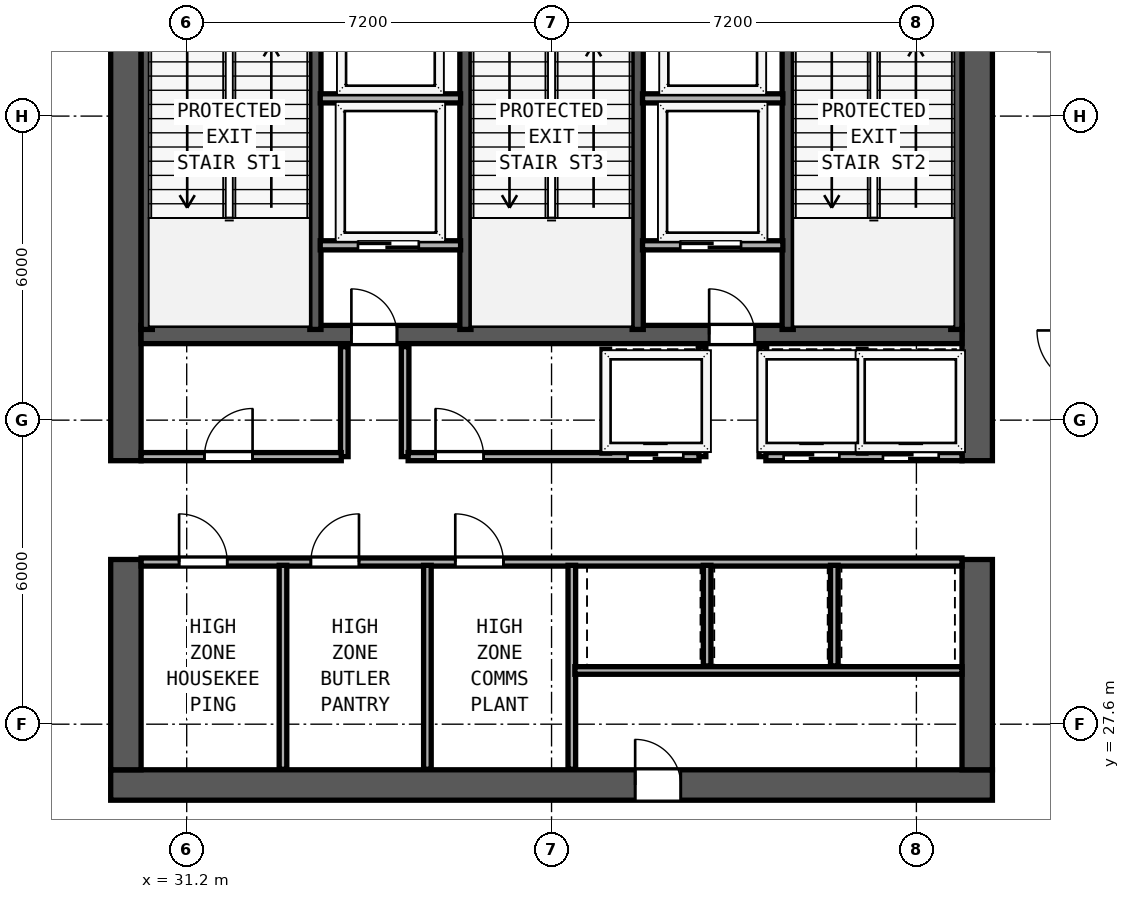
"""IFC4 building model, lengths in metres.
Left out: names, types, materials, properties, quantities, classifications, styles, units other than length and angle.
Written with IfcOpenShell. Run it as: python <this file> out.ifc"""

import sys

from ifc_helpers import new_model, si_unit, direction, frame, frame_2d, origin, place, context, subcontext, project, spatial, rectangle, extrude, element, fill, save


model = new_model("IFC4")
c1 = context("Model", 3, precision=1e-05, world=origin(), true_north=direction((0.0, 1.0)))
c2 = subcontext(c1, "Body", "Model", "MODEL_VIEW")
j1 = project(units=[si_unit("LENGTHUNIT", "METRE"), si_unit("PLANEANGLEUNIT", "RADIAN")], contexts=[c1])
p1 = place(None, origin())
s1 = spatial("IfcSite", under=j1, at=p1, CompositionType="ELEMENT")
p2 = place(p1, origin())
s2 = spatial("IfcBuilding", under=s1, at=p2, CompositionType="ELEMENT")
p3 = place(p2, frame((0.0, 0.0, 230.6)))
s3 = spatial("IfcBuildingStorey", under=s2, at=p3, CompositionType="ELEMENT", Elevation=230.6)
p4 = place(p3, frame((29.7, 26.4, 0.0), z_axis=(0.0, 0.0, 1.0), x_axis=(1.0, 0.0, 0.0)))
e1 = element("IfcWall", 1, at=p4, inside=s3, PredefinedType="SHEAR", context=c2, shape_type="SweptSolid", body=[
    extrude(rectangle(XDim=17.4, YDim=0.6, at=frame_2d((8.7, 0.0))), origin(), (0.0, 0.0, 1.0), 4.35),
])
p5 = place(p4, frame((11.25, 0.0, 0.0), z_axis=(0.0, 0.0, 1.0), x_axis=(-1.0, 0.0, 0.0)))
e2 = element("IfcOpeningElement", 2, at=p5, cuts=e1, PredefinedType="OPENING", context=c2, shape_type="SweptSolid", body=[
    extrude(rectangle(XDim=0.9, YDim=2.1, at=frame_2d((0.45, 1.05))), frame((0.0, 0.31, 0.0), z_axis=(0.0, -1.0, 0.0), x_axis=(1.0, 0.0, 0.0)), (0.0, 0.0, 1.0), 0.62),
])
p6 = place(p3, frame((30.0, 26.7, 0.0), z_axis=(0.0, 0.0, 1.0), x_axis=(0.0, 1.0, 0.0)))
e3 = element("IfcWall", 3, at=p6, inside=s3, PredefinedType="SHEAR", context=c2, shape_type="SweptSolid", body=[
    extrude(rectangle(XDim=4.15, YDim=0.6, at=frame_2d((2.075, 0.0))), origin(), (0.0, 0.0, 1.0), 4.35),
])
p7 = place(p3, frame((30.0, 32.8, 0.0), z_axis=(0.0, 0.0, 1.0), x_axis=(0.0, 1.0, 0.0)))
e4 = element("IfcWall", 4, at=p7, inside=s3, PredefinedType="SHEAR", context=c2, shape_type="SweptSolid", body=[
    extrude(rectangle(XDim=10.1, YDim=0.6, at=frame_2d((5.05, 0.0))), origin(), (0.0, 0.0, 1.0), 4.35),
])
p8 = place(p3, frame((46.8, 26.7, 0.0), z_axis=(0.0, 0.0, 1.0), x_axis=(0.0, 1.0, 0.0)))
e5 = element("IfcWall", 5, at=p8, inside=s3, PredefinedType="SHEAR", context=c2, shape_type="SweptSolid", body=[
    extrude(rectangle(XDim=4.15, YDim=0.6, at=frame_2d((2.075, 0.0))), origin(), (0.0, 0.0, 1.0), 4.35),
])
p9 = place(p3, frame((46.8, 32.8, 0.0), z_axis=(0.0, 0.0, 1.0), x_axis=(0.0, 1.0, 0.0)))
e6 = element("IfcWall", 6, at=p9, inside=s3, PredefinedType="SHEAR", context=c2, shape_type="SweptSolid", body=[
    extrude(rectangle(XDim=10.1, YDim=0.6, at=frame_2d((5.05, 0.0))), origin(), (0.0, 0.0, 1.0), 4.35),
])
p10 = place(p3, frame((30.3, 35.29, 0.0), z_axis=(0.0, 0.0, 1.0), x_axis=(1.0, 0.0, 0.0)))
e7 = element("IfcWall", 7, at=p10, inside=s3, PredefinedType="SHEAR", context=c2, shape_type="SweptSolid", body=[
    extrude(rectangle(XDim=16.2, YDim=0.36, at=frame_2d((8.1, 0.0))), origin(), (0.0, 0.0, 1.0), 4.35),
])
p11 = place(p10, frame((5.05, 0.0, 0.0), z_axis=(0.0, 0.0, 1.0), x_axis=(-1.0, 0.0, 0.0)))
e8 = element("IfcOpeningElement", 8, at=p11, cuts=e7, PredefinedType="OPENING", context=c2, shape_type="SweptSolid", body=[
    extrude(rectangle(XDim=0.9, YDim=2.1, at=frame_2d((0.45, 1.05))), frame((0.0, 0.19, 0.0), z_axis=(0.0, -1.0, 0.0), x_axis=(1.0, 0.0, 0.0)), (0.0, 0.0, 1.0), 0.38),
])
p12 = place(p10, frame((12.11, 0.0, 0.0), z_axis=(0.0, 0.0, 1.0), x_axis=(-1.0, 0.0, 0.0)))
e9 = element("IfcOpeningElement", 9, at=p12, cuts=e7, PredefinedType="OPENING", context=c2, shape_type="SweptSolid", body=[
    extrude(rectangle(XDim=0.9, YDim=2.1, at=frame_2d((0.45, 1.05))), frame((0.0, 0.19, 0.0), z_axis=(0.0, -1.0, 0.0), x_axis=(1.0, 0.0, 0.0)), (0.0, 0.0, 1.0), 0.38),
])
for number, where, z_axis, x_axis in (
    (10, (30.412, 35.39, 0.0), (0.0, 0.0, 1.0), (0.0, 1.0, 0.0)),
    (11, (33.74, 35.39, 0.0), (0.0, 0.0, 1.0), (0.0, 1.0, 0.0)),
    (12, (36.7, 35.39, 0.0), (0.0, 0.0, 1.0), (0.0, 1.0, 0.0)),
    (13, (40.1, 35.39, 0.0), (0.0, 0.0, 1.0), (0.0, 1.0, 0.0)),
    (14, (43.06, 35.39, 0.0), (0.0, 0.0, 1.0), (0.0, 1.0, 0.0)),
    (15, (46.388, 35.39, 0.0), (0.0, 0.0, 1.0), (0.0, 1.0, 0.0)),
):
    element("IfcWall", number, at=place(p3, frame(where, z_axis=z_axis, x_axis=x_axis)), inside=s3, PredefinedType="SHEAR", context=c2, shape_type="SweptSolid", body=[
        extrude(rectangle(XDim=7.51, YDim=0.22, at=frame_2d((3.755, 0.0))), origin(), (0.0, 0.0, 1.0), 4.35),
    ])
for number, where, z_axis, x_axis in (
    (16, (33.835, 39.95, 0.0), (0.0, 0.0, 1.0), (1.0, 0.0, 0.0)),
    (17, (40.195, 39.95, 0.0), (0.0, 0.0, 1.0), (1.0, 0.0, 0.0)),
):
    element("IfcWall", number, at=place(p3, frame(where, z_axis=z_axis, x_axis=x_axis)), inside=s3, PredefinedType="SOLIDWALL", context=c2, shape_type="SweptSolid", body=[
        extrude(rectangle(XDim=2.77, YDim=0.18, at=frame_2d((1.385, 0.0))), origin(), (0.0, 0.0, 1.0), 4.35),
    ])
p13 = place(p3, frame((33.835, 37.05, 0.0), z_axis=(0.0, 0.0, 1.0), x_axis=(1.0, 0.0, 0.0)))
e18 = element("IfcWall", 18, at=p13, inside=s3, PredefinedType="SOLIDWALL", context=c2, shape_type="SweptSolid", body=[
    extrude(rectangle(XDim=2.77, YDim=0.18, at=frame_2d((1.385, 0.0))), origin(), (0.0, 0.0, 1.0), 4.35),
])
p14 = place(p13, frame((1.945, 0.0, 0.0), z_axis=(0.0, 0.0, 1.0), x_axis=(-1.0, 0.0, 0.0)))
e19 = element("IfcOpeningElement", 19, at=p14, cuts=e18, PredefinedType="OPENING", context=c2, shape_type="SweptSolid", body=[
    extrude(rectangle(XDim=1.2, YDim=2.2, at=frame_2d((0.6, 1.1))), frame((0.0, 0.1, 0.0), z_axis=(0.0, -1.0, 0.0), x_axis=(1.0, 0.0, 0.0)), (0.0, 0.0, 1.0), 0.2),
])
for number, where, z_axis, x_axis in (
    (20, (34.31, 32.88, 0.0), (0.0, 0.0, 1.0), (0.0, 1.0, 0.0)),
    (21, (35.51, 32.88, 0.0), (0.0, 0.0, 1.0), (0.0, 1.0, 0.0)),
):
    element("IfcWall", number, at=place(p3, frame(where, z_axis=z_axis, x_axis=x_axis)), inside=s3, PredefinedType="SOLIDWALL", context=c2, shape_type="SweptSolid", body=[
        extrude(rectangle(XDim=2.17, YDim=0.15, at=frame_2d((1.085, 0.0))), origin(), (0.0, 0.0, 1.0), 4.35),
    ])
p15 = place(p3, frame((40.195, 37.05, 0.0), z_axis=(0.0, 0.0, 1.0), x_axis=(1.0, 0.0, 0.0)))
e22 = element("IfcWall", 22, at=p15, inside=s3, PredefinedType="SOLIDWALL", context=c2, shape_type="SweptSolid", body=[
    extrude(rectangle(XDim=2.77, YDim=0.18, at=frame_2d((1.385, 0.0))), origin(), (0.0, 0.0, 1.0), 4.35),
])
p16 = place(p15, frame((1.945, 0.0, 0.0), z_axis=(0.0, 0.0, 1.0), x_axis=(-1.0, 0.0, 0.0)))
e23 = element("IfcOpeningElement", 23, at=p16, cuts=e22, PredefinedType="OPENING", context=c2, shape_type="SweptSolid", body=[
    extrude(rectangle(XDim=1.2, YDim=2.2, at=frame_2d((0.6, 1.1))), frame((0.0, 0.1, 0.0), z_axis=(0.0, -1.0, 0.0), x_axis=(1.0, 0.0, 0.0)), (0.0, 0.0, 1.0), 0.2),
])
for number, where, z_axis, x_axis in (
    (24, (41.37, 32.88, 0.0), (0.0, 0.0, 1.0), (0.0, 1.0, 0.0)),
    (25, (42.57, 32.88, 0.0), (0.0, 0.0, 1.0), (0.0, 1.0, 0.0)),
):
    element("IfcWall", number, at=place(p3, frame(where, z_axis=z_axis, x_axis=x_axis)), inside=s3, PredefinedType="SOLIDWALL", context=c2, shape_type="SweptSolid", body=[
        extrude(rectangle(XDim=2.17, YDim=0.15, at=frame_2d((1.085, 0.0))), origin(), (0.0, 0.0, 1.0), 4.35),
    ])
p17 = place(p3, frame((30.3, 32.88, 0.0), z_axis=(0.0, 0.0, 1.0), x_axis=(1.0, 0.0, 0.0)))
e26 = element("IfcWall", 26, at=p17, inside=s3, PredefinedType="SOLIDWALL", context=c2, shape_type="SweptSolid", body=[
    extrude(rectangle(XDim=3.95, YDim=0.16, at=frame_2d((1.975, 0.0))), origin(), (0.0, 0.0, 1.0), 4.35),
])
p18 = place(p17, frame((2.2, 0.0, 0.0), z_axis=(0.0, 0.0, 1.0), x_axis=(-1.0, 0.0, 0.0)))
e27 = element("IfcOpeningElement", 27, at=p18, cuts=e26, PredefinedType="OPENING", context=c2, shape_type="SweptSolid", body=[
    extrude(rectangle(XDim=0.95, YDim=2.12, at=frame_2d((0.475, 1.06))), frame((0.0, 0.09, 0.0), z_axis=(0.0, -1.0, 0.0), x_axis=(1.0, 0.0, 0.0)), (0.0, 0.0, 1.0), 0.18),
])
p19 = place(p3, frame((35.57, 32.88, 0.0), z_axis=(0.0, 0.0, 1.0), x_axis=(1.0, 0.0, 0.0)))
e28 = element("IfcWall", 28, at=p19, inside=s3, PredefinedType="SOLIDWALL", context=c2, shape_type="SweptSolid", body=[
    extrude(rectangle(XDim=5.74, YDim=0.16, at=frame_2d((2.87, 0.0))), origin(), (0.0, 0.0, 1.0), 4.35),
])
p20 = place(p19, frame((1.49, 0.0, 0.0), z_axis=(0.0, 0.0, 1.0), x_axis=(-1.0, 0.0, 0.0)))
e29 = element("IfcOpeningElement", 29, at=p20, cuts=e28, PredefinedType="OPENING", context=c2, shape_type="SweptSolid", body=[
    extrude(rectangle(XDim=0.95, YDim=2.12, at=frame_2d((0.475, 1.06))), frame((0.0, 0.09, 0.0), z_axis=(0.0, -1.0, 0.0), x_axis=(1.0, 0.0, 0.0)), (0.0, 0.0, 1.0), 0.18),
])
p21 = place(p19, frame((5.43, 0.0, 0.0), z_axis=(0.0, 0.0, 1.0), x_axis=(-1.0, 0.0, 0.0)))
e30 = element("IfcOpeningElement", 30, at=p21, cuts=e28, PredefinedType="OPENING", context=c2, shape_type="SweptSolid", body=[
    extrude(rectangle(XDim=1.1, YDim=2.2, at=frame_2d((0.55, 1.1))), frame((0.0, 0.09, 0.0), z_axis=(0.0, -1.0, 0.0), x_axis=(1.0, 0.0, 0.0)), (0.0, 0.0, 1.0), 0.18),
])
p22 = place(p3, frame((42.63, 32.88, 0.0), z_axis=(0.0, 0.0, 1.0), x_axis=(1.0, 0.0, 0.0)))
e31 = element("IfcWall", 31, at=p22, inside=s3, PredefinedType="SOLIDWALL", context=c2, shape_type="SweptSolid", body=[
    extrude(rectangle(XDim=3.87, YDim=0.16, at=frame_2d((1.935, 0.0))), origin(), (0.0, 0.0, 1.0), 4.35),
])
p23 = place(p22, frame((1.45, 0.0, 0.0), z_axis=(0.0, 0.0, 1.0), x_axis=(-1.0, 0.0, 0.0)))
e32 = element("IfcOpeningElement", 32, at=p23, cuts=e31, PredefinedType="OPENING", context=c2, shape_type="SweptSolid", body=[
    extrude(rectangle(XDim=1.1, YDim=2.2, at=frame_2d((0.55, 1.1))), frame((0.0, 0.09, 0.0), z_axis=(0.0, -1.0, 0.0), x_axis=(1.0, 0.0, 0.0)), (0.0, 0.0, 1.0), 0.18),
])
p24 = place(p22, frame((3.41, 0.0, 0.0), z_axis=(0.0, 0.0, 1.0), x_axis=(-1.0, 0.0, 0.0)))
e33 = element("IfcOpeningElement", 33, at=p24, cuts=e31, PredefinedType="OPENING", context=c2, shape_type="SweptSolid", body=[
    extrude(rectangle(XDim=1.1, YDim=2.2, at=frame_2d((0.55, 1.1))), frame((0.0, 0.09, 0.0), z_axis=(0.0, -1.0, 0.0), x_axis=(1.0, 0.0, 0.0)), (0.0, 0.0, 1.0), 0.18),
])
for number, where, z_axis, x_axis in (
    (34, (39.47, 32.95, 0.0), (0.0, 0.0, 1.0), (0.0, 1.0, 0.0)),
    (35, (44.53, 32.95, 0.0), (0.0, 0.0, 1.0), (0.0, 1.0, 0.0)),
):
    element("IfcWall", number, at=place(p3, frame(where, z_axis=z_axis, x_axis=x_axis)), inside=s3, PredefinedType="SOLIDWALL", context=c2, shape_type="SweptSolid", body=[
        extrude(rectangle(XDim=2.05, YDim=0.15, at=frame_2d((1.025, 0.0))), origin(), (0.0, 0.0, 1.0), 4.35),
    ])
p25 = place(p3, frame((30.3, 30.8, 0.0), z_axis=(0.0, 0.0, 1.0), x_axis=(1.0, 0.0, 0.0)))
e36 = element("IfcWall", 36, at=p25, inside=s3, PredefinedType="SOLIDWALL", context=c2, shape_type="SweptSolid", body=[
    extrude(rectangle(XDim=16.2, YDim=0.16, at=frame_2d((8.1, 0.0))), origin(), (0.0, 0.0, 1.0), 4.35),
])
p26 = place(p25, frame((0.75, 0.0, 0.0)))
e37 = element("IfcOpeningElement", 37, at=p26, cuts=e36, PredefinedType="OPENING", context=c2, shape_type="SweptSolid", body=[
    extrude(rectangle(XDim=0.95, YDim=2.12, at=frame_2d((0.475, 1.06))), frame((0.0, 0.09, 0.0), z_axis=(0.0, -1.0, 0.0), x_axis=(1.0, 0.0, 0.0)), (0.0, 0.0, 1.0), 0.18),
])
p27 = place(p25, frame((3.35, 0.0, 0.0)))
e38 = element("IfcOpeningElement", 38, at=p27, cuts=e36, PredefinedType="OPENING", context=c2, shape_type="SweptSolid", body=[
    extrude(rectangle(XDim=0.95, YDim=2.12, at=frame_2d((0.475, 1.06))), frame((0.0, 0.09, 0.0), z_axis=(0.0, -1.0, 0.0), x_axis=(1.0, 0.0, 0.0)), (0.0, 0.0, 1.0), 0.18),
])
p28 = place(p25, frame((6.2, 0.0, 0.0)))
e39 = element("IfcOpeningElement", 39, at=p28, cuts=e36, PredefinedType="OPENING", context=c2, shape_type="SweptSolid", body=[
    extrude(rectangle(XDim=0.95, YDim=2.12, at=frame_2d((0.475, 1.06))), frame((0.0, 0.09, 0.0), z_axis=(0.0, -1.0, 0.0), x_axis=(1.0, 0.0, 0.0)), (0.0, 0.0, 1.0), 0.18),
])
p29 = place(p3, frame((38.8, 26.71, 0.0), z_axis=(0.0, 0.0, 1.0), x_axis=(0.0, 1.0, 0.0)))
e40 = element("IfcWall", 40, at=p29, inside=s3, PredefinedType="SOLIDWALL", context=c2, shape_type="SweptSolid", body=[
    extrude(rectangle(XDim=4.025, YDim=0.15, at=frame_2d((2.013, 0.0))), origin(), (0.0, 0.0, 1.0), 4.35),
])
for number, where, z_axis, x_axis in (
    (41, (33.1, 26.71, 0.0), (0.0, 0.0, 1.0), (0.0, 1.0, 0.0)),
    (42, (35.95, 26.71, 0.0), (0.0, 0.0, 1.0), (0.0, 1.0, 0.0)),
):
    element("IfcWall", number, at=place(p3, frame(where, z_axis=z_axis, x_axis=x_axis)), inside=s3, PredefinedType="PARTITIONING", context=c2, shape_type="SweptSolid", body=[
        extrude(rectangle(XDim=4.025, YDim=0.15, at=frame_2d((2.013, 0.0))), origin(), (0.0, 0.0, 1.0), 4.35),
    ])
p30 = place(p3, frame((38.86, 28.66, 0.0), z_axis=(0.0, 0.0, 1.0), x_axis=(1.0, 0.0, 0.0)))
e43 = element("IfcWall", 43, at=p30, inside=s3, PredefinedType="PARTITIONING", context=c2, shape_type="SweptSolid", body=[
    extrude(rectangle(XDim=7.64, YDim=0.15, at=frame_2d((3.82, 0.0))), origin(), (0.0, 0.0, 1.0), 4.35),
])
for number, where, z_axis, x_axis in (
    (44, (41.47, 28.75, 0.0), (0.0, 0.0, 1.0), (0.0, 1.0, 0.0)),
    (45, (43.98, 28.75, 0.0), (0.0, 0.0, 1.0), (0.0, 1.0, 0.0)),
):
    element("IfcWall", number, at=place(p3, frame(where, z_axis=z_axis, x_axis=x_axis)), inside=s3, PredefinedType="SOLIDWALL", context=c2, shape_type="SweptSolid", body=[
        extrude(rectangle(XDim=1.985, YDim=0.15, at=frame_2d((0.993, 0.0))), origin(), (0.0, 0.0, 1.0), 4.35),
    ])
p31 = place(p14, origin())
e46 = element("IfcDoor", 46, at=p31, inside=s3, OperationType="SLIDING_TO_RIGHT", PredefinedType="DOOR", context=c2, shape_type="SweptSolid", body=[
    extrude(rectangle(XDim=1.2, YDim=2.2, at=frame_2d((0.6, 1.1))), frame((0.0, 0.025, 0.0), z_axis=(0.0, -1.0, 0.0), x_axis=(1.0, 0.0, 0.0)), (0.0, 0.0, 1.0), 0.05),
])
fill(e19, e46)
p32 = place(p11, origin())
e47 = element("IfcDoor", 47, at=p32, inside=s3, OperationType="SINGLE_SWING_RIGHT", PredefinedType="DOOR", context=c2, shape_type="SweptSolid", body=[
    extrude(rectangle(XDim=0.9, YDim=2.1, at=frame_2d((0.45, 1.05))), frame((0.0, 0.025, 0.0), z_axis=(0.0, -1.0, 0.0), x_axis=(1.0, 0.0, 0.0)), (0.0, 0.0, 1.0), 0.05),
])
fill(e8, e47)
p33 = place(p16, origin())
e48 = element("IfcDoor", 48, at=p33, inside=s3, OperationType="SLIDING_TO_RIGHT", PredefinedType="DOOR", context=c2, shape_type="SweptSolid", body=[
    extrude(rectangle(XDim=1.2, YDim=2.2, at=frame_2d((0.6, 1.1))), frame((0.0, 0.025, 0.0), z_axis=(0.0, -1.0, 0.0), x_axis=(1.0, 0.0, 0.0)), (0.0, 0.0, 1.0), 0.05),
])
fill(e23, e48)
p34 = place(p12, origin())
e49 = element("IfcDoor", 49, at=p34, inside=s3, OperationType="SINGLE_SWING_RIGHT", PredefinedType="DOOR", context=c2, shape_type="SweptSolid", body=[
    extrude(rectangle(XDim=0.9, YDim=2.1, at=frame_2d((0.45, 1.05))), frame((0.0, 0.025, 0.0), z_axis=(0.0, -1.0, 0.0), x_axis=(1.0, 0.0, 0.0)), (0.0, 0.0, 1.0), 0.05),
])
fill(e9, e49)
p35 = place(p18, origin())
e50 = element("IfcDoor", 50, at=p35, inside=s3, OperationType="SINGLE_SWING_LEFT", PredefinedType="DOOR", context=c2, shape_type="SweptSolid", body=[
    extrude(rectangle(XDim=0.95, YDim=2.12, at=frame_2d((0.475, 1.06))), frame((0.0, 0.025, 0.0), z_axis=(0.0, -1.0, 0.0), x_axis=(1.0, 0.0, 0.0)), (0.0, 0.0, 1.0), 0.05),
])
fill(e27, e50)
p36 = place(p20, origin())
e51 = element("IfcDoor", 51, at=p36, inside=s3, OperationType="SINGLE_SWING_RIGHT", PredefinedType="DOOR", context=c2, shape_type="SweptSolid", body=[
    extrude(rectangle(XDim=0.95, YDim=2.12, at=frame_2d((0.475, 1.06))), frame((0.0, 0.025, 0.0), z_axis=(0.0, -1.0, 0.0), x_axis=(1.0, 0.0, 0.0)), (0.0, 0.0, 1.0), 0.05),
])
fill(e29, e51)
p37 = place(p21, origin())
e52 = element("IfcDoor", 52, at=p37, inside=s3, OperationType="SLIDING_TO_RIGHT", PredefinedType="DOOR", context=c2, shape_type="SweptSolid", body=[
    extrude(rectangle(XDim=1.1, YDim=2.2, at=frame_2d((0.55, 1.1))), frame((0.0, 0.025, 0.0), z_axis=(0.0, -1.0, 0.0), x_axis=(1.0, 0.0, 0.0)), (0.0, 0.0, 1.0), 0.05),
])
fill(e30, e52)
p38 = place(p23, origin())
e53 = element("IfcDoor", 53, at=p38, inside=s3, OperationType="SLIDING_TO_RIGHT", PredefinedType="DOOR", context=c2, shape_type="SweptSolid", body=[
    extrude(rectangle(XDim=1.1, YDim=2.2, at=frame_2d((0.55, 1.1))), frame((0.0, 0.025, 0.0), z_axis=(0.0, -1.0, 0.0), x_axis=(1.0, 0.0, 0.0)), (0.0, 0.0, 1.0), 0.05),
])
fill(e32, e53)
p39 = place(p24, origin())
e54 = element("IfcDoor", 54, at=p39, inside=s3, OperationType="SLIDING_TO_RIGHT", PredefinedType="DOOR", context=c2, shape_type="SweptSolid", body=[
    extrude(rectangle(XDim=1.1, YDim=2.2, at=frame_2d((0.55, 1.1))), frame((0.0, 0.025, 0.0), z_axis=(0.0, -1.0, 0.0), x_axis=(1.0, 0.0, 0.0)), (0.0, 0.0, 1.0), 0.05),
])
fill(e33, e54)
p40 = place(p26, origin())
e55 = element("IfcDoor", 55, at=p40, inside=s3, OperationType="SINGLE_SWING_LEFT", PredefinedType="DOOR", context=c2, shape_type="SweptSolid", body=[
    extrude(rectangle(XDim=0.95, YDim=2.12, at=frame_2d((0.475, 1.06))), frame((0.0, 0.025, 0.0), z_axis=(0.0, -1.0, 0.0), x_axis=(1.0, 0.0, 0.0)), (0.0, 0.0, 1.0), 0.05),
])
fill(e37, e55)
p41 = place(p27, origin())
e56 = element("IfcDoor", 56, at=p41, inside=s3, OperationType="SINGLE_SWING_RIGHT", PredefinedType="DOOR", context=c2, shape_type="SweptSolid", body=[
    extrude(rectangle(XDim=0.95, YDim=2.12, at=frame_2d((0.475, 1.06))), frame((0.0, 0.025, 0.0), z_axis=(0.0, -1.0, 0.0), x_axis=(1.0, 0.0, 0.0)), (0.0, 0.0, 1.0), 0.05),
])
fill(e38, e56)
p42 = place(p28, origin())
e57 = element("IfcDoor", 57, at=p42, inside=s3, OperationType="SINGLE_SWING_LEFT", PredefinedType="DOOR", context=c2, shape_type="SweptSolid", body=[
    extrude(rectangle(XDim=0.95, YDim=2.12, at=frame_2d((0.475, 1.06))), frame((0.0, 0.025, 0.0), z_axis=(0.0, -1.0, 0.0), x_axis=(1.0, 0.0, 0.0)), (0.0, 0.0, 1.0), 0.05),
])
fill(e39, e57)
p43 = place(p5, origin())
e58 = element("IfcDoor", 58, at=p43, inside=s3, OperationType="SINGLE_SWING_RIGHT", PredefinedType="DOOR", context=c2, shape_type="SweptSolid", body=[
    extrude(rectangle(XDim=0.9, YDim=2.1, at=frame_2d((0.45, 1.05))), frame((0.0, -0.195, 0.0), z_axis=(0.0, -1.0, 0.0), x_axis=(1.0, 0.0, 0.0)), (0.0, 0.0, 1.0), 0.05),
])
fill(e2, e58)
save(model, sys.argv[1])
